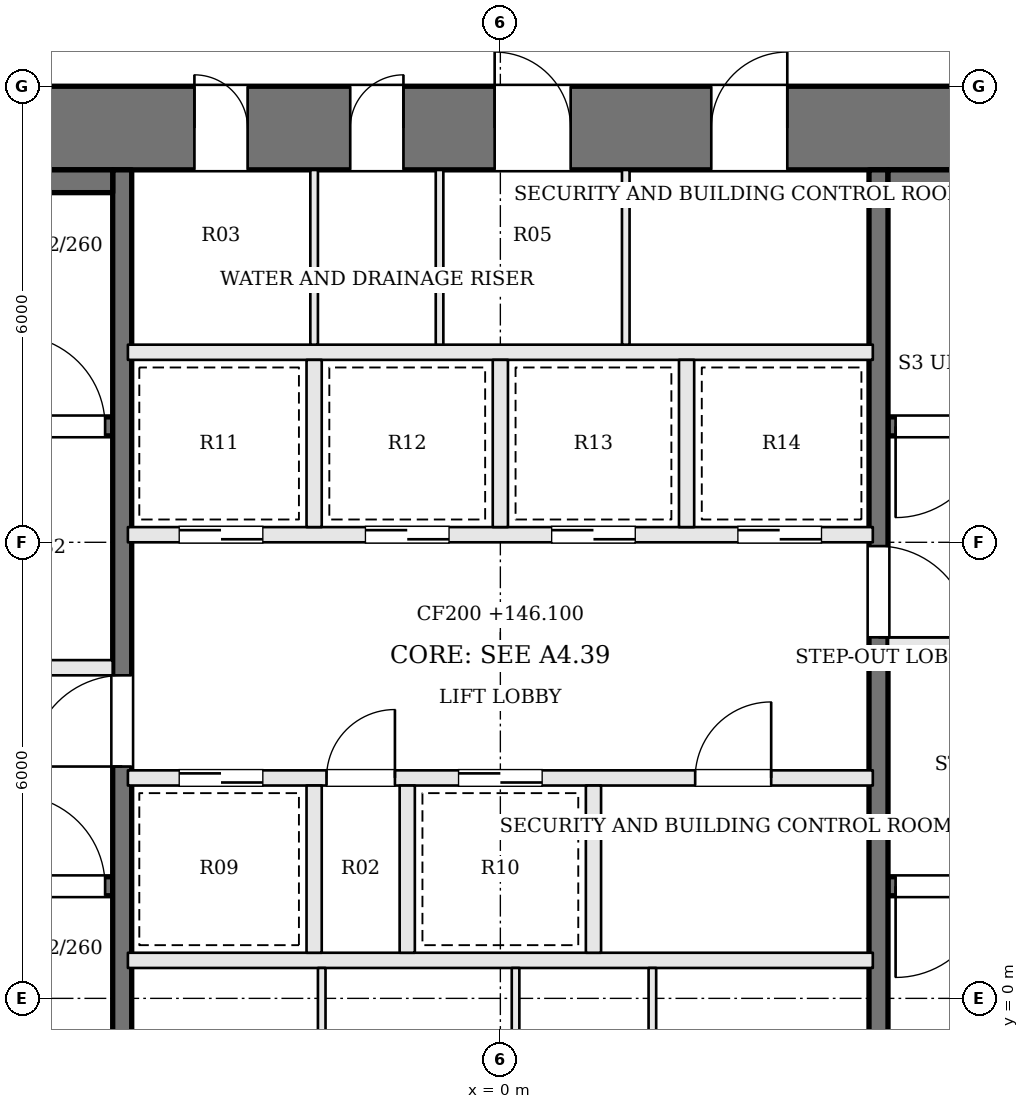
"""IFC4 building model, lengths in metres.
Left out: names, types, materials, properties, quantities, classifications, styles, units other than length and angle.
Written with IfcOpenShell. Run it as: python <this file> out.ifc"""

import sys

from ifc_helpers import new_model, si_unit, direction, frame, frame_2d, origin, place, context, subcontext, project, spatial, rectangle, extrude, element, fill, save


model = new_model("IFC4")
c1 = context("Model", 3, precision=1e-05, world=origin(), true_north=direction((0.0, 1.0)))
c2 = subcontext(c1, "Body", "Model", "MODEL_VIEW")
j1 = project(units=[si_unit("LENGTHUNIT", "METRE"), si_unit("PLANEANGLEUNIT", "RADIAN")], contexts=[c1])
p1 = place(None, origin())
s1 = spatial("IfcSite", under=j1, at=p1, CompositionType="ELEMENT")
p2 = place(p1, origin())
s2 = spatial("IfcBuilding", under=s1, at=p2, CompositionType="ELEMENT")
p3 = place(p2, frame((0.0, 0.0, 146.1)))
s3 = spatial("IfcBuildingStorey", under=s2, at=p3, CompositionType="ELEMENT", Elevation=146.1)
p4 = place(p3, frame((-13.0, 11.45, 0.0), z_axis=(0.0, 0.0, 1.0), x_axis=(1.0, 0.0, 0.0)))
e1 = element("IfcWall", 1, at=p4, inside=s3, PredefinedType="SHEAR", context=c2, shape_type="SweptSolid", body=[
    extrude(rectangle(XDim=26.0, YDim=1.1, at=frame_2d((13.0, 0.0))), origin(), (0.0, 0.0, 1.0), 3.9),
])
p5 = place(p4, frame((8.975, 0.0, 0.0)))
e2 = element("IfcOpeningElement", 2, at=p5, cuts=e1, PredefinedType="OPENING", context=c2, shape_type="SweptSolid", body=[
    extrude(rectangle(XDim=0.7, YDim=2.1, at=frame_2d((0.35, 1.05))), frame((0.0, 0.56, 0.0), z_axis=(0.0, -1.0, 0.0), x_axis=(1.0, 0.0, 0.0)), (0.0, 0.0, 1.0), 1.12),
])
p6 = place(p4, frame((11.025, 0.0, 0.0)))
e3 = element("IfcOpeningElement", 3, at=p6, cuts=e1, PredefinedType="OPENING", context=c2, shape_type="SweptSolid", body=[
    extrude(rectangle(XDim=0.7, YDim=2.1, at=frame_2d((0.35, 1.05))), frame((0.0, 0.56, 0.0), z_axis=(0.0, -1.0, 0.0), x_axis=(1.0, 0.0, 0.0)), (0.0, 0.0, 1.0), 1.12),
])
p7 = place(p4, frame((12.925, 0.0, 0.0)))
e4 = element("IfcOpeningElement", 4, at=p7, cuts=e1, PredefinedType="OPENING", context=c2, shape_type="SweptSolid", body=[
    extrude(rectangle(XDim=1.0, YDim=2.1, at=frame_2d((0.5, 1.05))), frame((0.0, 0.56, 0.0), z_axis=(0.0, -1.0, 0.0), x_axis=(1.0, 0.0, 0.0)), (0.0, 0.0, 1.0), 1.12),
])
p8 = place(p4, frame((15.775, 0.0, 0.0)))
e5 = element("IfcOpeningElement", 5, at=p8, cuts=e1, PredefinedType="OPENING", context=c2, shape_type="SweptSolid", body=[
    extrude(rectangle(XDim=1.0, YDim=2.1, at=frame_2d((0.5, 1.05))), frame((0.0, 0.56, 0.0), z_axis=(0.0, -1.0, 0.0), x_axis=(1.0, 0.0, 0.0)), (0.0, 0.0, 1.0), 1.12),
])
p9 = place(p3, frame((-11.9, 1.475, 0.0), z_axis=(0.0, 0.0, 1.0), x_axis=(1.0, 0.0, 0.0)))
e6 = element("IfcWall", 6, at=p9, inside=s3, PredefinedType="SOLIDWALL", context=c2, shape_type="SweptSolid", body=[
    extrude(rectangle(XDim=6.8, YDim=0.25, at=frame_2d((3.4, 0.0))), origin(), (0.0, 0.0, 1.0), 3.7),
])
p10 = place(p9, frame((5.5, 0.0, 0.0)))
e7 = element("IfcOpeningElement", 7, at=p10, cuts=e6, PredefinedType="OPENING", context=c2, shape_type="SweptSolid", body=[
    extrude(rectangle(XDim=1.2, YDim=2.1, at=frame_2d((0.6, 1.05))), frame((0.0, 0.135, 0.0), z_axis=(0.0, -1.0, 0.0), x_axis=(1.0, 0.0, 0.0)), (0.0, 0.0, 1.0), 0.27),
])
p11 = place(p3, frame((11.9, 7.525, 0.0), z_axis=(0.0, 0.0, 1.0), x_axis=(-1.0, 0.0, 0.0)))
e8 = element("IfcWall", 8, at=p11, inside=s3, PredefinedType="SOLIDWALL", context=c2, shape_type="SweptSolid", body=[
    extrude(rectangle(XDim=6.8, YDim=0.25, at=frame_2d((3.4, 0.0))), origin(), (0.0, 0.0, 1.0), 3.7),
])
p12 = place(p11, frame((5.5, 0.0, 0.0)))
e9 = element("IfcOpeningElement", 9, at=p12, cuts=e8, PredefinedType="OPENING", context=c2, shape_type="SweptSolid", body=[
    extrude(rectangle(XDim=1.2, YDim=2.1, at=frame_2d((0.6, 1.05))), frame((0.0, 0.135, 0.0), z_axis=(0.0, -1.0, 0.0), x_axis=(1.0, 0.0, 0.0)), (0.0, 0.0, 1.0), 0.27),
])
p13 = place(p3, frame((-11.9, 4.35, 0.0), z_axis=(0.0, 0.0, 1.0), x_axis=(1.0, 0.0, 0.0)))
e10 = element("IfcWall", 10, at=p13, inside=s3, PredefinedType="SOLIDWALL", context=c2, shape_type="SweptSolid", body=[
    extrude(rectangle(XDim=6.8, YDim=0.2, at=frame_2d((3.4, 0.0))), origin(), (0.0, 0.0, 1.0), 3.7),
])
p14 = place(p13, frame((4.1, 0.0, 0.0)))
e11 = element("IfcOpeningElement", 11, at=p14, cuts=e10, PredefinedType="OPENING", context=c2, shape_type="SweptSolid", body=[
    extrude(rectangle(XDim=1.2, YDim=2.1, at=frame_2d((0.6, 1.05))), frame((0.0, 0.11, 0.0), z_axis=(0.0, -1.0, 0.0), x_axis=(1.0, 0.0, 0.0)), (0.0, 0.0, 1.0), 0.22),
])
p15 = place(p13, frame((0.8, 0.0, 0.0)))
e12 = element("IfcOpeningElement", 12, at=p15, cuts=e10, PredefinedType="OPENING", context=c2, shape_type="SweptSolid", body=[
    extrude(rectangle(XDim=1.2, YDim=2.1, at=frame_2d((0.6, 1.05))), frame((0.0, 0.11, 0.0), z_axis=(0.0, -1.0, 0.0), x_axis=(1.0, 0.0, 0.0)), (0.0, 0.0, 1.0), 0.22),
])
p16 = place(p3, frame((11.9, 4.65, 0.0), z_axis=(0.0, 0.0, 1.0), x_axis=(-1.0, 0.0, 0.0)))
e13 = element("IfcWall", 13, at=p16, inside=s3, PredefinedType="SOLIDWALL", context=c2, shape_type="SweptSolid", body=[
    extrude(rectangle(XDim=6.8, YDim=0.2, at=frame_2d((3.4, 0.0))), origin(), (0.0, 0.0, 1.0), 3.7),
])
p17 = place(p16, frame((4.1, 0.0, 0.0)))
e14 = element("IfcOpeningElement", 14, at=p17, cuts=e13, PredefinedType="OPENING", context=c2, shape_type="SweptSolid", body=[
    extrude(rectangle(XDim=1.2, YDim=2.1, at=frame_2d((0.6, 1.05))), frame((0.0, 0.11, 0.0), z_axis=(0.0, -1.0, 0.0), x_axis=(1.0, 0.0, 0.0)), (0.0, 0.0, 1.0), 0.22),
])
p18 = place(p16, frame((0.8, 0.0, 0.0)))
e15 = element("IfcOpeningElement", 15, at=p18, cuts=e13, PredefinedType="OPENING", context=c2, shape_type="SweptSolid", body=[
    extrude(rectangle(XDim=1.2, YDim=2.1, at=frame_2d((0.6, 1.05))), frame((0.0, 0.11, 0.0), z_axis=(0.0, -1.0, 0.0), x_axis=(1.0, 0.0, 0.0)), (0.0, 0.0, 1.0), 0.22),
])
p19 = place(p3, frame((-11.9, 7.525, 0.0), z_axis=(0.0, 0.0, 1.0), x_axis=(1.0, 0.0, 0.0)))
e16 = element("IfcWall", 16, at=p19, inside=s3, PredefinedType="SOLIDWALL", context=c2, shape_type="SweptSolid", body=[
    extrude(rectangle(XDim=6.8, YDim=0.25, at=frame_2d((3.4, 0.0))), origin(), (0.0, 0.0, 1.0), 3.7),
])
p20 = place(p19, frame((5.5, 0.0, 0.0)))
e17 = element("IfcOpeningElement", 17, at=p20, cuts=e16, PredefinedType="OPENING", context=c2, shape_type="SweptSolid", body=[
    extrude(rectangle(XDim=1.2, YDim=2.1, at=frame_2d((0.6, 1.05))), frame((0.0, 0.135, 0.0), z_axis=(0.0, -1.0, 0.0), x_axis=(1.0, 0.0, 0.0)), (0.0, 0.0, 1.0), 0.27),
])
p21 = place(p3, frame((11.9, 1.475, 0.0), z_axis=(0.0, 0.0, 1.0), x_axis=(-1.0, 0.0, 0.0)))
e18 = element("IfcWall", 18, at=p21, inside=s3, PredefinedType="SOLIDWALL", context=c2, shape_type="SweptSolid", body=[
    extrude(rectangle(XDim=6.8, YDim=0.25, at=frame_2d((3.4, 0.0))), origin(), (0.0, 0.0, 1.0), 3.7),
])
p22 = place(p21, frame((5.5, 0.0, 0.0)))
e19 = element("IfcOpeningElement", 19, at=p22, cuts=e18, PredefinedType="OPENING", context=c2, shape_type="SweptSolid", body=[
    extrude(rectangle(XDim=1.2, YDim=2.1, at=frame_2d((0.6, 1.05))), frame((0.0, 0.135, 0.0), z_axis=(0.0, -1.0, 0.0), x_axis=(1.0, 0.0, 0.0)), (0.0, 0.0, 1.0), 0.27),
])
p23 = place(p3, frame((-4.975, -1.9, 0.0), z_axis=(0.0, 0.0, 1.0), x_axis=(0.0, 1.0, 0.0)))
e20 = element("IfcWall", 20, at=p23, inside=s3, PredefinedType="SOLIDWALL", context=c2, shape_type="SweptSolid", body=[
    extrude(rectangle(XDim=12.8, YDim=0.25, at=frame_2d((6.4, 0.0))), origin(), (0.0, 0.0, 1.0), 3.7),
])
p24 = place(p23, frame((4.95, 0.0, 0.0)))
e21 = element("IfcOpeningElement", 21, at=p24, cuts=e20, PredefinedType="OPENING", context=c2, shape_type="SweptSolid", body=[
    extrude(rectangle(XDim=1.2, YDim=2.1, at=frame_2d((0.6, 1.05))), frame((0.0, 0.135, 0.0), z_axis=(0.0, -1.0, 0.0), x_axis=(1.0, 0.0, 0.0)), (0.0, 0.0, 1.0), 0.27),
])
p25 = place(p3, frame((4.975, 10.9, 0.0), z_axis=(0.0, 0.0, 1.0), x_axis=(0.0, -1.0, 0.0)))
e22 = element("IfcWall", 22, at=p25, inside=s3, PredefinedType="SOLIDWALL", context=c2, shape_type="SweptSolid", body=[
    extrude(rectangle(XDim=12.8, YDim=0.25, at=frame_2d((6.4, 0.0))), origin(), (0.0, 0.0, 1.0), 3.7),
])
p26 = place(p25, frame((4.95, 0.0, 0.0)))
e23 = element("IfcOpeningElement", 23, at=p26, cuts=e22, PredefinedType="OPENING", context=c2, shape_type="SweptSolid", body=[
    extrude(rectangle(XDim=1.2, YDim=2.1, at=frame_2d((0.6, 1.05))), frame((0.0, 0.135, 0.0), z_axis=(0.0, -1.0, 0.0), x_axis=(1.0, 0.0, 0.0)), (0.0, 0.0, 1.0), 0.27),
])
for number, where, z_axis, x_axis in (
    (24, (-11.9, 10.75, 0.0), (0.0, 0.0, 1.0), (1.0, 0.0, 0.0)),
    (25, (11.9, 10.75, 0.0), (0.0, 0.0, 1.0), (-1.0, 0.0, 0.0)),
):
    element("IfcWall", number, at=place(p3, frame(where, z_axis=z_axis, x_axis=x_axis)), inside=s3, PredefinedType="SOLIDWALL", context=c2, shape_type="SweptSolid", body=[
        extrude(rectangle(XDim=6.8, YDim=0.3, at=frame_2d((3.4, 0.0))), origin(), (0.0, 0.0, 1.0), 3.7),
    ])
p27 = place(p3, frame((-4.9, 0.5, 0.0), z_axis=(0.0, 0.0, 1.0), x_axis=(1.0, 0.0, 0.0)))
e26 = element("IfcWall", 26, at=p27, inside=s3, PredefinedType="SOLIDWALL", context=c2, shape_type="SweptSolid", body=[
    extrude(rectangle(XDim=9.8, YDim=0.2, at=frame_2d((4.9, 0.0))), origin(), (0.0, 0.0, 1.0), 3.7),
])
p28 = place(p3, frame((-4.9, 2.9, 0.0), z_axis=(0.0, 0.0, 1.0), x_axis=(1.0, 0.0, 0.0)))
e27 = element("IfcWall", 27, at=p28, inside=s3, PredefinedType="SOLIDWALL", context=c2, shape_type="SweptSolid", body=[
    extrude(rectangle(XDim=9.8, YDim=0.2, at=frame_2d((4.9, 0.0))), origin(), (0.0, 0.0, 1.0), 3.7),
])
p29 = place(p28, frame((0.675, 0.0, 0.0)))
e28 = element("IfcOpeningElement", 28, at=p29, cuts=e27, PredefinedType="OPENING", context=c2, shape_type="SweptSolid", body=[
    extrude(rectangle(XDim=1.1, YDim=2.1, at=frame_2d((0.55, 1.05))), frame((0.0, 0.11, 0.0), z_axis=(0.0, -1.0, 0.0), x_axis=(1.0, 0.0, 0.0)), (0.0, 0.0, 1.0), 0.22),
])
p30 = place(p28, frame((2.613, 0.0, 0.0)))
e29 = element("IfcOpeningElement", 29, at=p30, cuts=e27, PredefinedType="OPENING", context=c2, shape_type="SweptSolid", body=[
    extrude(rectangle(XDim=0.9, YDim=2.1, at=frame_2d((0.45, 1.05))), frame((0.0, 0.11, 0.0), z_axis=(0.0, -1.0, 0.0), x_axis=(1.0, 0.0, 0.0)), (0.0, 0.0, 1.0), 0.22),
])
p31 = place(p28, frame((4.35, 0.0, 0.0)))
e30 = element("IfcOpeningElement", 30, at=p31, cuts=e27, PredefinedType="OPENING", context=c2, shape_type="SweptSolid", body=[
    extrude(rectangle(XDim=1.1, YDim=2.1, at=frame_2d((0.55, 1.05))), frame((0.0, 0.11, 0.0), z_axis=(0.0, -1.0, 0.0), x_axis=(1.0, 0.0, 0.0)), (0.0, 0.0, 1.0), 0.22),
])
p32 = place(p28, frame((7.463, 0.0, 0.0)))
e31 = element("IfcOpeningElement", 31, at=p32, cuts=e27, PredefinedType="OPENING", context=c2, shape_type="SweptSolid", body=[
    extrude(rectangle(XDim=1.0, YDim=2.1, at=frame_2d((0.5, 1.05))), frame((0.0, 0.11, 0.0), z_axis=(0.0, -1.0, 0.0), x_axis=(1.0, 0.0, 0.0)), (0.0, 0.0, 1.0), 0.22),
])
p33 = place(p3, frame((-4.9, 6.1, 0.0), z_axis=(0.0, 0.0, 1.0), x_axis=(1.0, 0.0, 0.0)))
e32 = element("IfcWall", 32, at=p33, inside=s3, PredefinedType="SOLIDWALL", context=c2, shape_type="SweptSolid", body=[
    extrude(rectangle(XDim=9.8, YDim=0.2, at=frame_2d((4.9, 0.0))), origin(), (0.0, 0.0, 1.0), 3.7),
])
p34 = place(p33, frame((0.675, 0.0, 0.0)))
e33 = element("IfcOpeningElement", 33, at=p34, cuts=e32, PredefinedType="OPENING", context=c2, shape_type="SweptSolid", body=[
    extrude(rectangle(XDim=1.1, YDim=2.1, at=frame_2d((0.55, 1.05))), frame((0.0, 0.11, 0.0), z_axis=(0.0, -1.0, 0.0), x_axis=(1.0, 0.0, 0.0)), (0.0, 0.0, 1.0), 0.22),
])
p35 = place(p33, frame((3.125, 0.0, 0.0)))
e34 = element("IfcOpeningElement", 34, at=p35, cuts=e32, PredefinedType="OPENING", context=c2, shape_type="SweptSolid", body=[
    extrude(rectangle(XDim=1.1, YDim=2.1, at=frame_2d((0.55, 1.05))), frame((0.0, 0.11, 0.0), z_axis=(0.0, -1.0, 0.0), x_axis=(1.0, 0.0, 0.0)), (0.0, 0.0, 1.0), 0.22),
])
p36 = place(p33, frame((5.575, 0.0, 0.0)))
e35 = element("IfcOpeningElement", 35, at=p36, cuts=e32, PredefinedType="OPENING", context=c2, shape_type="SweptSolid", body=[
    extrude(rectangle(XDim=1.1, YDim=2.1, at=frame_2d((0.55, 1.05))), frame((0.0, 0.11, 0.0), z_axis=(0.0, -1.0, 0.0), x_axis=(1.0, 0.0, 0.0)), (0.0, 0.0, 1.0), 0.22),
])
p37 = place(p33, frame((8.025, 0.0, 0.0)))
e36 = element("IfcOpeningElement", 36, at=p37, cuts=e32, PredefinedType="OPENING", context=c2, shape_type="SweptSolid", body=[
    extrude(rectangle(XDim=1.1, YDim=2.1, at=frame_2d((0.55, 1.05))), frame((0.0, 0.11, 0.0), z_axis=(0.0, -1.0, 0.0), x_axis=(1.0, 0.0, 0.0)), (0.0, 0.0, 1.0), 0.22),
])
p38 = place(p3, frame((-4.9, 8.5, 0.0), z_axis=(0.0, 0.0, 1.0), x_axis=(1.0, 0.0, 0.0)))
e37 = element("IfcWall", 37, at=p38, inside=s3, PredefinedType="SOLIDWALL", context=c2, shape_type="SweptSolid", body=[
    extrude(rectangle(XDim=9.8, YDim=0.2, at=frame_2d((4.9, 0.0))), origin(), (0.0, 0.0, 1.0), 3.7),
])
for number, where, z_axis, x_axis in (
    (38, (-2.45, 0.6, 0.0), (0.0, 0.0, 1.0), (0.0, 1.0, 0.0)),
    (39, (-1.225, 0.6, 0.0), (0.0, 0.0, 1.0), (0.0, 1.0, 0.0)),
    (40, (1.225, 0.6, 0.0), (0.0, 0.0, 1.0), (0.0, 1.0, 0.0)),
    (41, (-2.45, 6.2, 0.0), (0.0, 0.0, 1.0), (0.0, 1.0, 0.0)),
    (42, (0.0, 6.2, 0.0), (0.0, 0.0, 1.0), (0.0, 1.0, 0.0)),
    (43, (2.45, 6.2, 0.0), (0.0, 0.0, 1.0), (0.0, 1.0, 0.0)),
):
    element("IfcWall", number, at=place(p3, frame(where, z_axis=z_axis, x_axis=x_axis)), inside=s3, PredefinedType="SOLIDWALL", context=c2, shape_type="SweptSolid", body=[
        extrude(rectangle(XDim=2.2, YDim=0.2, at=frame_2d((1.1, 0.0))), origin(), (0.0, 0.0, 1.0), 3.7),
    ])
for number, where, z_axis, x_axis in (
    (44, (-2.35, -1.9, 0.0), (0.0, 0.0, 1.0), (0.0, 1.0, 0.0)),
    (45, (0.2, -1.9, 0.0), (0.0, 0.0, 1.0), (0.0, 1.0, 0.0)),
    (46, (2.0, -1.9, 0.0), (0.0, 0.0, 1.0), (0.0, 1.0, 0.0)),
    (47, (-2.45, 8.6, 0.0), (0.0, 0.0, 1.0), (0.0, 1.0, 0.0)),
    (48, (-0.8, 8.6, 0.0), (0.0, 0.0, 1.0), (0.0, 1.0, 0.0)),
    (49, (1.65, 8.6, 0.0), (0.0, 0.0, 1.0), (0.0, 1.0, 0.0)),
):
    element("IfcWall", number, at=place(p3, frame(where, z_axis=z_axis, x_axis=x_axis)), inside=s3, PredefinedType="PARTITIONING", context=c2, shape_type="SweptSolid", body=[
        extrude(rectangle(XDim=2.3, YDim=0.1, at=frame_2d((1.15, 0.0))), origin(), (0.0, 0.0, 1.0), 3.7),
    ])
p39 = place(p24, origin())
e50 = element("IfcDoor", 50, at=p39, inside=s3, OperationType="SINGLE_SWING_LEFT", PredefinedType="DOOR", context=c2, shape_type="SweptSolid", body=[
    extrude(rectangle(XDim=1.2, YDim=2.1, at=frame_2d((0.6, 1.05))), frame((0.0, 0.025, 0.0), z_axis=(0.0, -1.0, 0.0), x_axis=(1.0, 0.0, 0.0)), (0.0, 0.0, 1.0), 0.05),
])
fill(e21, e50)
p40 = place(p26, origin())
e51 = element("IfcDoor", 51, at=p40, inside=s3, OperationType="SINGLE_SWING_RIGHT", PredefinedType="DOOR", context=c2, shape_type="SweptSolid", body=[
    extrude(rectangle(XDim=1.2, YDim=2.1, at=frame_2d((0.6, 1.05))), frame((0.0, 0.025, 0.0), z_axis=(0.0, -1.0, 0.0), x_axis=(1.0, 0.0, 0.0)), (0.0, 0.0, 1.0), 0.05),
])
fill(e23, e51)
p41 = place(p10, origin())
e52 = element("IfcDoor", 52, at=p41, inside=s3, OperationType="SINGLE_SWING_LEFT", PredefinedType="DOOR", context=c2, shape_type="SweptSolid", body=[
    extrude(rectangle(XDim=1.2, YDim=2.1, at=frame_2d((0.6, 1.05))), frame((0.0, 0.025, 0.0), z_axis=(0.0, -1.0, 0.0), x_axis=(1.0, 0.0, 0.0)), (0.0, 0.0, 1.0), 0.05),
])
fill(e7, e52)
p42 = place(p12, origin())
e53 = element("IfcDoor", 53, at=p42, inside=s3, OperationType="SINGLE_SWING_RIGHT", PredefinedType="DOOR", context=c2, shape_type="SweptSolid", body=[
    extrude(rectangle(XDim=1.2, YDim=2.1, at=frame_2d((0.6, 1.05))), frame((0.0, 0.025, 0.0), z_axis=(0.0, -1.0, 0.0), x_axis=(1.0, 0.0, 0.0)), (0.0, 0.0, 1.0), 0.05),
])
fill(e9, e53)
p43 = place(p20, origin())
e54 = element("IfcDoor", 54, at=p43, inside=s3, OperationType="SINGLE_SWING_LEFT", PredefinedType="DOOR", context=c2, shape_type="SweptSolid", body=[
    extrude(rectangle(XDim=1.2, YDim=2.1, at=frame_2d((0.6, 1.05))), frame((0.0, 0.025, 0.0), z_axis=(0.0, -1.0, 0.0), x_axis=(1.0, 0.0, 0.0)), (0.0, 0.0, 1.0), 0.05),
])
fill(e17, e54)
p44 = place(p22, origin())
e55 = element("IfcDoor", 55, at=p44, inside=s3, OperationType="SINGLE_SWING_RIGHT", PredefinedType="DOOR", context=c2, shape_type="SweptSolid", body=[
    extrude(rectangle(XDim=1.2, YDim=2.1, at=frame_2d((0.6, 1.05))), frame((0.0, 0.025, 0.0), z_axis=(0.0, -1.0, 0.0), x_axis=(1.0, 0.0, 0.0)), (0.0, 0.0, 1.0), 0.05),
])
fill(e19, e55)
p45 = place(p29, origin())
e56 = element("IfcDoor", 56, at=p45, inside=s3, OperationType="SLIDING_TO_RIGHT", PredefinedType="DOOR", context=c2, shape_type="SweptSolid", body=[
    extrude(rectangle(XDim=1.1, YDim=2.1, at=frame_2d((0.55, 1.05))), frame((0.0, 0.025, 0.0), z_axis=(0.0, -1.0, 0.0), x_axis=(1.0, 0.0, 0.0)), (0.0, 0.0, 1.0), 0.05),
])
fill(e28, e56)
p46 = place(p30, origin())
e57 = element("IfcDoor", 57, at=p46, inside=s3, OperationType="SINGLE_SWING_RIGHT", PredefinedType="DOOR", context=c2, shape_type="SweptSolid", body=[
    extrude(rectangle(XDim=0.9, YDim=2.1, at=frame_2d((0.45, 1.05))), frame((0.0, 0.025, 0.0), z_axis=(0.0, -1.0, 0.0), x_axis=(1.0, 0.0, 0.0)), (0.0, 0.0, 1.0), 0.05),
])
fill(e29, e57)
p47 = place(p31, origin())
e58 = element("IfcDoor", 58, at=p47, inside=s3, OperationType="SLIDING_TO_LEFT", PredefinedType="DOOR", context=c2, shape_type="SweptSolid", body=[
    extrude(rectangle(XDim=1.1, YDim=2.1, at=frame_2d((0.55, 1.05))), frame((0.0, 0.025, 0.0), z_axis=(0.0, -1.0, 0.0), x_axis=(1.0, 0.0, 0.0)), (0.0, 0.0, 1.0), 0.05),
])
fill(e30, e58)
p48 = place(p32, origin())
e59 = element("IfcDoor", 59, at=p48, inside=s3, OperationType="SINGLE_SWING_RIGHT", PredefinedType="DOOR", context=c2, shape_type="SweptSolid", body=[
    extrude(rectangle(XDim=1.0, YDim=2.1, at=frame_2d((0.5, 1.05))), frame((0.0, 0.025, 0.0), z_axis=(0.0, -1.0, 0.0), x_axis=(1.0, 0.0, 0.0)), (0.0, 0.0, 1.0), 0.05),
])
fill(e31, e59)
p49 = place(p34, origin())
e60 = element("IfcDoor", 60, at=p49, inside=s3, OperationType="SLIDING_TO_RIGHT", PredefinedType="DOOR", context=c2, shape_type="SweptSolid", body=[
    extrude(rectangle(XDim=1.1, YDim=2.1, at=frame_2d((0.55, 1.05))), frame((0.0, 0.025, 0.0), z_axis=(0.0, -1.0, 0.0), x_axis=(1.0, 0.0, 0.0)), (0.0, 0.0, 1.0), 0.05),
])
fill(e33, e60)
p50 = place(p35, origin())
e61 = element("IfcDoor", 61, at=p50, inside=s3, OperationType="SLIDING_TO_LEFT", PredefinedType="DOOR", context=c2, shape_type="SweptSolid", body=[
    extrude(rectangle(XDim=1.1, YDim=2.1, at=frame_2d((0.55, 1.05))), frame((0.0, 0.025, 0.0), z_axis=(0.0, -1.0, 0.0), x_axis=(1.0, 0.0, 0.0)), (0.0, 0.0, 1.0), 0.05),
])
fill(e34, e61)
p51 = place(p36, origin())
e62 = element("IfcDoor", 62, at=p51, inside=s3, OperationType="SLIDING_TO_RIGHT", PredefinedType="DOOR", context=c2, shape_type="SweptSolid", body=[
    extrude(rectangle(XDim=1.1, YDim=2.1, at=frame_2d((0.55, 1.05))), frame((0.0, 0.025, 0.0), z_axis=(0.0, -1.0, 0.0), x_axis=(1.0, 0.0, 0.0)), (0.0, 0.0, 1.0), 0.05),
])
fill(e35, e62)
p52 = place(p37, origin())
e63 = element("IfcDoor", 63, at=p52, inside=s3, OperationType="SLIDING_TO_LEFT", PredefinedType="DOOR", context=c2, shape_type="SweptSolid", body=[
    extrude(rectangle(XDim=1.1, YDim=2.1, at=frame_2d((0.55, 1.05))), frame((0.0, 0.025, 0.0), z_axis=(0.0, -1.0, 0.0), x_axis=(1.0, 0.0, 0.0)), (0.0, 0.0, 1.0), 0.05),
])
fill(e36, e63)
p53 = place(p5, origin())
e64 = element("IfcDoor", 64, at=p53, inside=s3, OperationType="SINGLE_SWING_LEFT", PredefinedType="DOOR", context=c2, shape_type="SweptSolid", body=[
    extrude(rectangle(XDim=0.7, YDim=2.1, at=frame_2d((0.35, 1.05))), frame((0.0, 0.025, 0.0), z_axis=(0.0, -1.0, 0.0), x_axis=(1.0, 0.0, 0.0)), (0.0, 0.0, 1.0), 0.05),
])
fill(e2, e64)
p54 = place(p6, origin())
e65 = element("IfcDoor", 65, at=p54, inside=s3, OperationType="SINGLE_SWING_RIGHT", PredefinedType="DOOR", context=c2, shape_type="SweptSolid", body=[
    extrude(rectangle(XDim=0.7, YDim=2.1, at=frame_2d((0.35, 1.05))), frame((0.0, 0.025, 0.0), z_axis=(0.0, -1.0, 0.0), x_axis=(1.0, 0.0, 0.0)), (0.0, 0.0, 1.0), 0.05),
])
fill(e3, e65)
p55 = place(p7, origin())
e66 = element("IfcDoor", 66, at=p55, inside=s3, OperationType="SINGLE_SWING_LEFT", PredefinedType="DOOR", context=c2, shape_type="SweptSolid", body=[
    extrude(rectangle(XDim=1.0, YDim=2.1, at=frame_2d((0.5, 1.05))), frame((0.0, 0.025, 0.0), z_axis=(0.0, -1.0, 0.0), x_axis=(1.0, 0.0, 0.0)), (0.0, 0.0, 1.0), 0.05),
])
fill(e4, e66)
p56 = place(p8, origin())
e67 = element("IfcDoor", 67, at=p56, inside=s3, OperationType="SINGLE_SWING_RIGHT", PredefinedType="DOOR", context=c2, shape_type="SweptSolid", body=[
    extrude(rectangle(XDim=1.0, YDim=2.1, at=frame_2d((0.5, 1.05))), frame((0.0, 0.025, 0.0), z_axis=(0.0, -1.0, 0.0), x_axis=(1.0, 0.0, 0.0)), (0.0, 0.0, 1.0), 0.05),
])
fill(e5, e67)
save(model, sys.argv[1])
